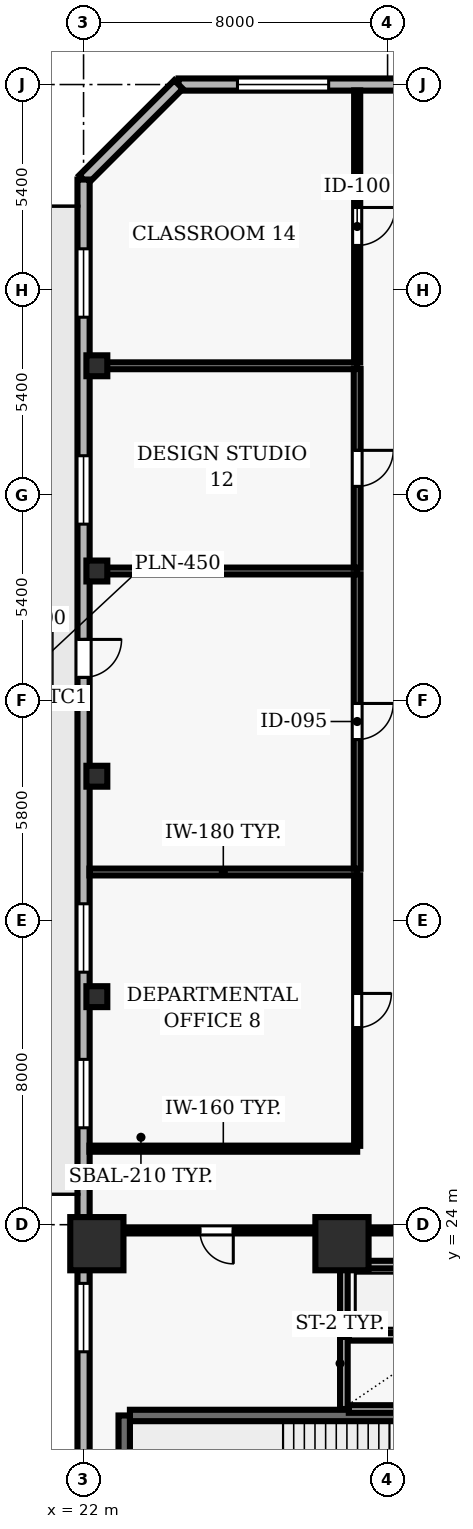
"""IFC4 building model, lengths in metres.
Left out: names, types, materials, properties, quantities, classifications, styles, units other than length and angle.
Written with IfcOpenShell. Run it as: python <this file> out.ifc"""

import sys

from ifc_helpers import new_model, si_unit, direction, frame, frame_2d, origin, origin_2d, place, context, subcontext, project, spatial, rectangle, hollow_rectangle, extrude, element, fill, save


model = new_model("IFC4")
c1 = context("Model", 3, precision=1e-05, world=origin(), true_north=direction((0.0, 1.0)))
c2 = subcontext(c1, "Body", "Model", "MODEL_VIEW")
j1 = project(units=[si_unit("LENGTHUNIT", "METRE"), si_unit("PLANEANGLEUNIT", "RADIAN")], contexts=[c1])
p1 = place(None, origin())
s1 = spatial("IfcSite", under=j1, at=p1, CompositionType="ELEMENT")
p2 = place(p1, origin())
s2 = spatial("IfcBuilding", under=s1, at=p2, CompositionType="ELEMENT")
p3 = place(p2, frame((0.0, 0.0, 77.8)))
s3 = spatial("IfcBuildingStorey", under=s2, at=p3, CompositionType="ELEMENT", Elevation=77.8)
for number, where, z_axis, x_axis in (
    (1, (22.35, 23.5, 0.0), (0.0, 0.0, 1.0), (1.0, 0.0, 0.0)),
    (2, (28.8, 23.5, 0.0), (0.0, 0.0, 1.0), (1.0, 0.0, 0.0)),
):
    element("IfcColumn", number, at=place(p3, frame(where, z_axis=z_axis, x_axis=x_axis)), inside=s3, PredefinedType="COLUMN", context=c2, shape_type="SweptSolid", body=[
        extrude(rectangle(XDim=1.4, YDim=1.4, at=origin_2d()), origin(), (0.0, 0.0, 1.0), 3.9),
    ])
for number, where, z_axis, x_axis in (
    (3, (22.35, 30.0, 0.0), (0.0, 0.0, 1.0), (1.0, 0.0, 0.0)),
    (4, (22.35, 35.8, 0.0), (0.0, 0.0, 1.0), (1.0, 0.0, 0.0)),
    (5, (22.35, 41.2, 0.0), (0.0, 0.0, 1.0), (1.0, 0.0, 0.0)),
    (6, (22.35, 46.6, 0.0), (0.0, 0.0, 1.0), (1.0, 0.0, 0.0)),
):
    element("IfcColumn", number, at=place(p3, frame(where, z_axis=z_axis, x_axis=x_axis)), inside=s3, PredefinedType="COLUMN", context=c2, shape_type="SweptSolid", body=[
        extrude(hollow_rectangle(XDim=0.55, YDim=0.55, WallThickness=0.025, at=origin_2d()), origin(), (0.0, 0.0, 1.0), 3.9),
    ])
p4 = place(p3, frame((35.5, 54.0, 0.0), z_axis=(0.0, 0.0, 1.0), x_axis=(-1.0, 0.0, 0.0)))
e7 = element("IfcWall", 7, at=p4, inside=s3, PredefinedType="SOLIDWALL", context=c2, shape_type="SweptSolid", body=[
    extrude(rectangle(XDim=11.0, YDim=0.32, at=frame_2d((5.5, 0.0))), origin(), (0.0, 0.0, 1.0), 3.69),
])
p5 = place(p4, frame((1.1, 0.0, 0.9)))
e8 = element("IfcOpeningElement", 8, at=p5, cuts=e7, PredefinedType="OPENING", context=c2, shape_type="SweptSolid", body=[
    extrude(rectangle(XDim=2.4, YDim=1.6, at=frame_2d((1.2, 0.8))), frame((0.0, 0.17, 0.0), z_axis=(0.0, -1.0, 0.0), x_axis=(1.0, 0.0, 0.0)), (0.0, 0.0, 1.0), 0.34),
])
p6 = place(p4, frame((7.05, 0.0, 0.9)))
e9 = element("IfcOpeningElement", 9, at=p6, cuts=e7, PredefinedType="OPENING", context=c2, shape_type="SweptSolid", body=[
    extrude(rectangle(XDim=2.4, YDim=1.6, at=frame_2d((1.2, 0.8))), frame((0.0, 0.17, 0.0), z_axis=(0.0, -1.0, 0.0), x_axis=(1.0, 0.0, 0.0)), (0.0, 0.0, 1.0), 0.34),
])
p7 = place(p3, frame((24.5, 54.0, 0.0), z_axis=(0.0, 0.0, 1.0), x_axis=(-0.707106781187, -0.707106781187, 0.0)))
e10 = element("IfcWall", 10, at=p7, inside=s3, PredefinedType="SOLIDWALL", context=c2, shape_type="SweptSolid", body=[
    extrude(rectangle(XDim=3.536, YDim=0.32, at=frame_2d((1.768, 0.0))), origin(), (0.0, 0.0, 1.0), 3.69),
])
p8 = place(p3, frame((22.0, 51.5, 0.0), z_axis=(0.0, 0.0, 1.0), x_axis=(0.0, -1.0, 0.0)))
e11 = element("IfcWall", 11, at=p8, inside=s3, PredefinedType="SOLIDWALL", context=c2, shape_type="SweptSolid", body=[
    extrude(rectangle(XDim=49.0, YDim=0.32, at=frame_2d((24.5, 0.0))), origin(), (0.0, 0.0, 1.0), 3.69),
])
p9 = place(p8, frame((12.1, 0.0, 0.0)))
e12 = element("IfcOpeningElement", 12, at=p9, cuts=e11, PredefinedType="OPENING", context=c2, shape_type="SweptSolid", body=[
    extrude(rectangle(XDim=1.0, YDim=2.2, at=frame_2d((0.5, 1.1))), frame((0.0, 0.17, 0.0), z_axis=(0.0, -1.0, 0.0), x_axis=(1.0, 0.0, 0.0)), (0.0, 0.0, 1.0), 0.34),
])
p10 = place(p8, frame((1.822, 0.0, 0.9)))
e13 = element("IfcOpeningElement", 13, at=p10, cuts=e11, PredefinedType="OPENING", context=c2, shape_type="SweptSolid", body=[
    extrude(rectangle(XDim=1.8, YDim=1.8, at=frame_2d((0.9, 0.9))), frame((0.0, 0.17, 0.0), z_axis=(0.0, -1.0, 0.0), x_axis=(1.0, 0.0, 0.0)), (0.0, 0.0, 1.0), 0.34),
])
p11 = place(p8, frame((7.267, 0.0, 0.9)))
e14 = element("IfcOpeningElement", 14, at=p11, cuts=e11, PredefinedType="OPENING", context=c2, shape_type="SweptSolid", body=[
    extrude(rectangle(XDim=1.8, YDim=1.8, at=frame_2d((0.9, 0.9))), frame((0.0, 0.17, 0.0), z_axis=(0.0, -1.0, 0.0), x_axis=(1.0, 0.0, 0.0)), (0.0, 0.0, 1.0), 0.34),
])
p12 = place(p8, frame((19.056, 0.0, 0.9)))
e15 = element("IfcOpeningElement", 15, at=p12, cuts=e11, PredefinedType="OPENING", context=c2, shape_type="SweptSolid", body=[
    extrude(rectangle(XDim=1.8, YDim=1.8, at=frame_2d((0.9, 0.9))), frame((0.0, 0.17, 0.0), z_axis=(0.0, -1.0, 0.0), x_axis=(1.0, 0.0, 0.0)), (0.0, 0.0, 1.0), 0.34),
])
p13 = place(p8, frame((23.15, 0.0, 0.9)))
e16 = element("IfcOpeningElement", 16, at=p13, cuts=e11, PredefinedType="OPENING", context=c2, shape_type="SweptSolid", body=[
    extrude(rectangle(XDim=1.8, YDim=1.8, at=frame_2d((0.9, 0.9))), frame((0.0, 0.17, 0.0), z_axis=(0.0, -1.0, 0.0), x_axis=(1.0, 0.0, 0.0)), (0.0, 0.0, 1.0), 0.34),
])
p14 = place(p8, frame((29.044, 0.0, 0.9)))
e17 = element("IfcOpeningElement", 17, at=p14, cuts=e11, PredefinedType="OPENING", context=c2, shape_type="SweptSolid", body=[
    extrude(rectangle(XDim=1.8, YDim=1.8, at=frame_2d((0.9, 0.9))), frame((0.0, 0.17, 0.0), z_axis=(0.0, -1.0, 0.0), x_axis=(1.0, 0.0, 0.0)), (0.0, 0.0, 1.0), 0.34),
])
p15 = place(p8, frame((34.039, 0.0, 0.9)))
e18 = element("IfcOpeningElement", 18, at=p15, cuts=e11, PredefinedType="OPENING", context=c2, shape_type="SweptSolid", body=[
    extrude(rectangle(XDim=1.8, YDim=1.8, at=frame_2d((0.9, 0.9))), frame((0.0, 0.17, 0.0), z_axis=(0.0, -1.0, 0.0), x_axis=(1.0, 0.0, 0.0)), (0.0, 0.0, 1.0), 0.34),
])
p16 = place(p8, frame((39.933, 0.0, 0.9)))
e19 = element("IfcOpeningElement", 19, at=p16, cuts=e11, PredefinedType="OPENING", context=c2, shape_type="SweptSolid", body=[
    extrude(rectangle(XDim=1.8, YDim=1.8, at=frame_2d((0.9, 0.9))), frame((0.0, 0.17, 0.0), z_axis=(0.0, -1.0, 0.0), x_axis=(1.0, 0.0, 0.0)), (0.0, 0.0, 1.0), 0.34),
])
p17 = place(p3, frame((31.58, 18.98, 0.0), z_axis=(0.0, 0.0, 1.0), x_axis=(-1.0, 0.0, 0.0)))
e20 = element("IfcWall", 20, at=p17, inside=s3, PredefinedType="SHEAR", context=c2, shape_type="SweptSolid", body=[
    extrude(rectangle(XDim=8.36, YDim=0.3, at=frame_2d((4.18, 0.0))), origin(), (0.0, 0.0, 1.0), 3.69),
])
p18 = place(p3, frame((23.07, 18.98, 0.0), z_axis=(0.0, 0.0, 1.0), x_axis=(0.0, -1.0, 0.0)))
e21 = element("IfcWall", 21, at=p18, inside=s3, PredefinedType="SHEAR", context=c2, shape_type="SweptSolid", body=[
    extrude(rectangle(XDim=3.51, YDim=0.3, at=frame_2d((1.755, 0.0))), origin(), (0.0, 0.0, 1.0), 3.69),
])
p19 = place(p3, frame((28.85, 21.05, 0.0), z_axis=(0.0, 0.0, 1.0), x_axis=(0.0, -1.0, 0.0)))
e22 = element("IfcWall", 22, at=p19, inside=s3, PredefinedType="SOLIDWALL", context=c2, shape_type="SweptSolid", body=[
    extrude(rectangle(XDim=1.9, YDim=0.2, at=frame_2d((0.95, 0.0))), origin(), (0.0, 0.0, 1.0), 3.69),
])
for number, where, z_axis, x_axis in (
    (23, (28.98, 19.15, 0.0), (0.0, 0.0, 1.0), (1.0, 0.0, 0.0)),
    (24, (31.42, 21.05, 0.0), (0.0, 0.0, 1.0), (-1.0, 0.0, 0.0)),
):
    element("IfcWall", number, at=place(p3, frame(where, z_axis=z_axis, x_axis=x_axis)), inside=s3, PredefinedType="SOLIDWALL", context=c2, shape_type="SweptSolid", body=[
        extrude(rectangle(XDim=2.44, YDim=0.2, at=frame_2d((1.22, 0.0))), origin(), (0.0, 0.0, 1.0), 3.69),
    ])
p20 = place(p3, frame((28.85, 22.95, 0.0), z_axis=(0.0, 0.0, 1.0), x_axis=(0.0, -1.0, 0.0)))
e25 = element("IfcWall", 25, at=p20, inside=s3, PredefinedType="SOLIDWALL", context=c2, shape_type="SweptSolid", body=[
    extrude(rectangle(XDim=1.9, YDim=0.2, at=frame_2d((0.95, 0.0))), origin(), (0.0, 0.0, 1.0), 3.69),
])
p21 = place(p3, frame((31.43, 22.95, 0.0), z_axis=(0.0, 0.0, 1.0), x_axis=(-1.0, 0.0, 0.0)))
e26 = element("IfcWall", 26, at=p21, inside=s3, PredefinedType="SOLIDWALL", context=c2, shape_type="SweptSolid", body=[
    extrude(rectangle(XDim=2.46, YDim=0.2, at=frame_2d((1.23, 0.0))), origin(), (0.0, 0.0, 1.0), 3.69),
])
p22 = place(p3, frame((28.8, 23.85, 0.0), z_axis=(0.0, 0.0, 1.0), x_axis=(-1.0, 0.0, 0.0)))
e27 = element("IfcWall", 27, at=p22, inside=s3, PredefinedType="PARTITIONING", context=c2, shape_type="SweptSolid", body=[
    extrude(rectangle(XDim=6.6, YDim=0.16, at=frame_2d((3.3, 0.0))), origin(), (0.0, 0.0, 1.0), 2.995),
])
p23 = place(p22, frame((2.86, 0.0, 0.0)))
e28 = element("IfcOpeningElement", 28, at=p23, cuts=e27, PredefinedType="OPENING", context=c2, shape_type="SweptSolid", body=[
    extrude(rectangle(XDim=0.88, YDim=2.1, at=frame_2d((0.44, 1.05))), frame((0.0, 0.09, 0.0), z_axis=(0.0, -1.0, 0.0), x_axis=(1.0, 0.0, 0.0)), (0.0, 0.0, 1.0), 0.18),
])
p24 = place(p3, frame((28.8, 23.85, 0.0), z_axis=(0.0, 0.0, 1.0), x_axis=(1.0, 0.0, 0.0)))
e29 = element("IfcWall", 29, at=p24, inside=s3, PredefinedType="PARTITIONING", context=c2, shape_type="SweptSolid", body=[
    extrude(rectangle(XDim=2.85, YDim=0.16, at=frame_2d((1.425, 0.0))), origin(), (0.0, 0.0, 1.0), 3.69),
])
p25 = place(p3, frame((29.2, 26.0, 0.0), z_axis=(0.0, 0.0, 1.0), x_axis=(-1.0, 0.0, 0.0)))
e30 = element("IfcWall", 30, at=p25, inside=s3, PredefinedType="PARTITIONING", context=c2, shape_type="SweptSolid", body=[
    extrude(rectangle(XDim=7.045, YDim=0.16, at=frame_2d((3.522, 0.0))), origin(), (0.0, 0.0, 1.0), 3.69),
])
p26 = place(p3, frame((29.2, 33.28, 0.0), z_axis=(0.0, 0.0, 1.0), x_axis=(-1.0, 0.0, 0.0)))
e31 = element("IfcWall", 31, at=p26, inside=s3, PredefinedType="PARTITIONING", context=c2, shape_type="SweptSolid", body=[
    extrude(rectangle(XDim=7.045, YDim=0.18, at=frame_2d((3.522, 0.0))), origin(), (0.0, 0.0, 1.0), 3.227),
])
for number, where, z_axis, x_axis in (
    (32, (29.2, 41.2, 0.0), (0.0, 0.0, 1.0), (-1.0, 0.0, 0.0)),
    (33, (29.2, 46.6, 0.0), (0.0, 0.0, 1.0), (-1.0, 0.0, 0.0)),
):
    element("IfcWall", number, at=place(p3, frame(where, z_axis=z_axis, x_axis=x_axis)), inside=s3, PredefinedType="PARTITIONING", context=c2, shape_type="SweptSolid", body=[
        extrude(rectangle(XDim=7.045, YDim=0.18, at=frame_2d((3.522, 0.0))), origin(), (0.0, 0.0, 1.0), 2.995),
    ])
p27 = place(p3, frame((28.8, 22.95, 0.0), z_axis=(0.0, 0.0, 1.0), x_axis=(0.0, 1.0, 0.0)))
e34 = element("IfcWall", 34, at=p27, inside=s3, PredefinedType="PARTITIONING", context=c2, shape_type="SweptSolid", body=[
    extrude(rectangle(XDim=0.825, YDim=0.135, at=frame_2d((0.413, 0.0))), origin(), (0.0, 0.0, 1.0), 3.69),
])
p28 = place(p3, frame((29.2, 33.195, 0.0), z_axis=(0.0, 0.0, 1.0), x_axis=(0.0, -1.0, 0.0)))
e35 = element("IfcWall", 35, at=p28, inside=s3, PredefinedType="PARTITIONING", context=c2, shape_type="SweptSolid", body=[
    extrude(rectangle(XDim=7.12, YDim=0.16, at=frame_2d((3.56, 0.0))), origin(), (0.0, 0.0, 1.0), 3.69),
])
p29 = place(p28, frame((3.11, 0.0, 0.0)))
e36 = element("IfcOpeningElement", 36, at=p29, cuts=e35, PredefinedType="OPENING", context=c2, shape_type="SweptSolid", body=[
    extrude(rectangle(XDim=0.9, YDim=2.1, at=frame_2d((0.45, 1.05))), frame((0.0, 0.09, 0.0), z_axis=(0.0, -1.0, 0.0), x_axis=(1.0, 0.0, 0.0)), (0.0, 0.0, 1.0), 0.18),
])
p30 = place(p3, frame((29.2, 41.115, 0.0), z_axis=(0.0, 0.0, 1.0), x_axis=(0.0, -1.0, 0.0)))
e37 = element("IfcWall", 37, at=p30, inside=s3, PredefinedType="PARTITIONING", context=c2, shape_type="SweptSolid", body=[
    extrude(rectangle(XDim=7.75, YDim=0.18, at=frame_2d((3.875, 0.0))), origin(), (0.0, 0.0, 1.0), 3.69),
])
p31 = place(p30, frame((3.4, 0.0, 0.0)))
e38 = element("IfcOpeningElement", 38, at=p31, cuts=e37, PredefinedType="OPENING", context=c2, shape_type="SweptSolid", body=[
    extrude(rectangle(XDim=0.95, YDim=2.1, at=frame_2d((0.475, 1.05))), frame((0.0, 0.1, 0.0), z_axis=(0.0, -1.0, 0.0), x_axis=(1.0, 0.0, 0.0)), (0.0, 0.0, 1.0), 0.2),
])
p32 = place(p3, frame((29.2, 46.515, 0.0), z_axis=(0.0, 0.0, 1.0), x_axis=(0.0, -1.0, 0.0)))
e39 = element("IfcWall", 39, at=p32, inside=s3, PredefinedType="PARTITIONING", context=c2, shape_type="SweptSolid", body=[
    extrude(rectangle(XDim=5.23, YDim=0.18, at=frame_2d((2.615, 0.0))), origin(), (0.0, 0.0, 1.0), 3.69),
])
p33 = place(p32, frame((2.14, 0.0, 0.0)))
e40 = element("IfcOpeningElement", 40, at=p33, cuts=e39, PredefinedType="OPENING", context=c2, shape_type="SweptSolid", body=[
    extrude(rectangle(XDim=0.95, YDim=2.1, at=frame_2d((0.475, 1.05))), frame((0.0, 0.1, 0.0), z_axis=(0.0, -1.0, 0.0), x_axis=(1.0, 0.0, 0.0)), (0.0, 0.0, 1.0), 0.2),
])
p34 = place(p3, frame((29.2, 53.845, 0.0), z_axis=(0.0, 0.0, 1.0), x_axis=(0.0, -1.0, 0.0)))
e41 = element("IfcWall", 41, at=p34, inside=s3, PredefinedType="PARTITIONING", context=c2, shape_type="SweptSolid", body=[
    extrude(rectangle(XDim=7.16, YDim=0.16, at=frame_2d((3.58, 0.0))), origin(), (0.0, 0.0, 1.0), 3.69),
])
p35 = place(p34, frame((3.08, 0.0, 0.0)))
e42 = element("IfcOpeningElement", 42, at=p35, cuts=e41, PredefinedType="OPENING", context=c2, shape_type="SweptSolid", body=[
    extrude(rectangle(XDim=1.0, YDim=2.1, at=frame_2d((0.5, 1.05))), frame((0.0, 0.09, 0.0), z_axis=(0.0, -1.0, 0.0), x_axis=(1.0, 0.0, 0.0)), (0.0, 0.0, 1.0), 0.18),
])
p36 = place(p6, origin())
e43 = element("IfcWindow", 43, at=p36, inside=s3, PartitioningType="SINGLE_PANEL", PredefinedType="WINDOW", context=c2, shape_type="SweptSolid", body=[
    extrude(rectangle(XDim=2.4, YDim=1.6, at=frame_2d((1.2, 0.8))), frame((0.0, 0.03, 0.0), z_axis=(0.0, -1.0, 0.0), x_axis=(1.0, 0.0, 0.0)), (0.0, 0.0, 1.0), 0.06),
])
fill(e9, e43)
p37 = place(p9, origin())
e44 = element("IfcDoor", 44, at=p37, inside=s3, OperationType="SINGLE_SWING_LEFT", PredefinedType="DOOR", context=c2, shape_type="SweptSolid", body=[
    extrude(rectangle(XDim=1.0, YDim=2.2, at=frame_2d((0.5, 1.1))), frame((0.0, 0.025, 0.0), z_axis=(0.0, -1.0, 0.0), x_axis=(1.0, 0.0, 0.0)), (0.0, 0.0, 1.0), 0.05),
])
fill(e12, e44)
p38 = place(p10, origin())
e45 = element("IfcWindow", 45, at=p38, inside=s3, PartitioningType="SINGLE_PANEL", PredefinedType="WINDOW", context=c2, shape_type="SweptSolid", body=[
    extrude(rectangle(XDim=1.8, YDim=1.8, at=frame_2d((0.9, 0.9))), frame((0.0, 0.03, 0.0), z_axis=(0.0, -1.0, 0.0), x_axis=(1.0, 0.0, 0.0)), (0.0, 0.0, 1.0), 0.06),
])
fill(e13, e45)
p39 = place(p11, origin())
e46 = element("IfcWindow", 46, at=p39, inside=s3, PartitioningType="SINGLE_PANEL", PredefinedType="WINDOW", context=c2, shape_type="SweptSolid", body=[
    extrude(rectangle(XDim=1.8, YDim=1.8, at=frame_2d((0.9, 0.9))), frame((0.0, 0.03, 0.0), z_axis=(0.0, -1.0, 0.0), x_axis=(1.0, 0.0, 0.0)), (0.0, 0.0, 1.0), 0.06),
])
fill(e14, e46)
p40 = place(p12, origin())
e47 = element("IfcWindow", 47, at=p40, inside=s3, PartitioningType="SINGLE_PANEL", PredefinedType="WINDOW", context=c2, shape_type="SweptSolid", body=[
    extrude(rectangle(XDim=1.8, YDim=1.8, at=frame_2d((0.9, 0.9))), frame((0.0, 0.03, 0.0), z_axis=(0.0, -1.0, 0.0), x_axis=(1.0, 0.0, 0.0)), (0.0, 0.0, 1.0), 0.06),
])
fill(e15, e47)
p41 = place(p13, origin())
e48 = element("IfcWindow", 48, at=p41, inside=s3, PartitioningType="SINGLE_PANEL", PredefinedType="WINDOW", context=c2, shape_type="SweptSolid", body=[
    extrude(rectangle(XDim=1.8, YDim=1.8, at=frame_2d((0.9, 0.9))), frame((0.0, 0.03, 0.0), z_axis=(0.0, -1.0, 0.0), x_axis=(1.0, 0.0, 0.0)), (0.0, 0.0, 1.0), 0.06),
])
fill(e16, e48)
p42 = place(p14, origin())
e49 = element("IfcWindow", 49, at=p42, inside=s3, PartitioningType="SINGLE_PANEL", PredefinedType="WINDOW", context=c2, shape_type="SweptSolid", body=[
    extrude(rectangle(XDim=1.8, YDim=1.8, at=frame_2d((0.9, 0.9))), frame((0.0, 0.03, 0.0), z_axis=(0.0, -1.0, 0.0), x_axis=(1.0, 0.0, 0.0)), (0.0, 0.0, 1.0), 0.06),
])
fill(e17, e49)
p43 = place(p23, origin())
e50 = element("IfcDoor", 50, at=p43, inside=s3, OperationType="SINGLE_SWING_LEFT", PredefinedType="DOOR", context=c2, shape_type="SweptSolid", body=[
    extrude(rectangle(XDim=0.88, YDim=2.1, at=frame_2d((0.44, 1.05))), frame((0.0, 0.025, 0.0), z_axis=(0.0, -1.0, 0.0), x_axis=(1.0, 0.0, 0.0)), (0.0, 0.0, 1.0), 0.05),
])
fill(e28, e50)
p44 = place(p29, origin())
e51 = element("IfcDoor", 51, at=p44, inside=s3, OperationType="SINGLE_SWING_LEFT", PredefinedType="DOOR", context=c2, shape_type="SweptSolid", body=[
    extrude(rectangle(XDim=0.9, YDim=2.1, at=frame_2d((0.45, 1.05))), frame((0.0, 0.025, 0.0), z_axis=(0.0, -1.0, 0.0), x_axis=(1.0, 0.0, 0.0)), (0.0, 0.0, 1.0), 0.05),
])
fill(e36, e51)
p45 = place(p31, origin())
e52 = element("IfcDoor", 52, at=p45, inside=s3, OperationType="SINGLE_SWING_LEFT", PredefinedType="DOOR", context=c2, shape_type="SweptSolid", body=[
    extrude(rectangle(XDim=0.95, YDim=2.1, at=frame_2d((0.475, 1.05))), frame((0.0, 0.025, 0.0), z_axis=(0.0, -1.0, 0.0), x_axis=(1.0, 0.0, 0.0)), (0.0, 0.0, 1.0), 0.05),
])
fill(e38, e52)
p46 = place(p33, origin())
e53 = element("IfcDoor", 53, at=p46, inside=s3, OperationType="SINGLE_SWING_LEFT", PredefinedType="DOOR", context=c2, shape_type="SweptSolid", body=[
    extrude(rectangle(XDim=0.95, YDim=2.1, at=frame_2d((0.475, 1.05))), frame((0.0, 0.025, 0.0), z_axis=(0.0, -1.0, 0.0), x_axis=(1.0, 0.0, 0.0)), (0.0, 0.0, 1.0), 0.05),
])
fill(e40, e53)
p47 = place(p35, origin())
e54 = element("IfcDoor", 54, at=p47, inside=s3, OperationType="SINGLE_SWING_LEFT", PredefinedType="DOOR", context=c2, shape_type="SweptSolid", body=[
    extrude(rectangle(XDim=1.0, YDim=2.1, at=frame_2d((0.5, 1.05))), frame((0.0, 0.025, 0.0), z_axis=(0.0, -1.0, 0.0), x_axis=(1.0, 0.0, 0.0)), (0.0, 0.0, 1.0), 0.05),
])
fill(e42, e54)
save(model, sys.argv[1])
